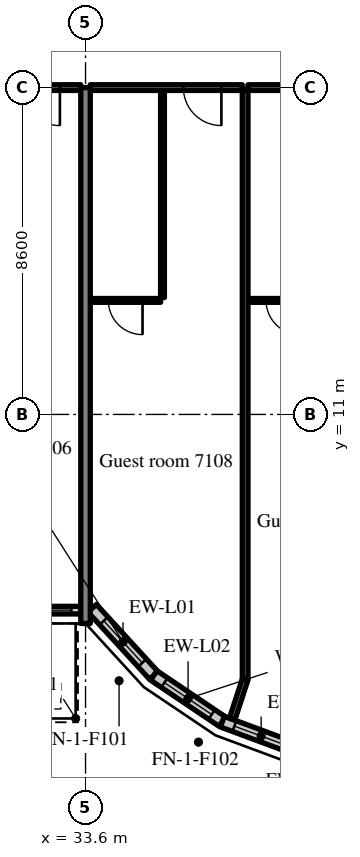
"""IFC4 building model, lengths in metres.
Left out: names, types, materials, properties, quantities, classifications, styles, units other than length and angle.
Written with IfcOpenShell. Run it as: python <this file> out.ifc"""

import sys

from ifc_helpers import new_model, si_unit, direction, frame, frame_2d, origin, place, context, subcontext, project, spatial, rectangle, extrude, source, transform, mapped, element, fill, save


model = new_model("IFC4")
c1 = context("Model", 3, precision=1e-05, world=origin(), true_north=direction((0.0, 1.0)))
c2 = subcontext(c1, "Body", "Model", "MODEL_VIEW")
j1 = project(units=[si_unit("LENGTHUNIT", "METRE"), si_unit("PLANEANGLEUNIT", "RADIAN")], contexts=[c1])
p1 = place(None, origin())
s1 = spatial("IfcSite", under=j1, at=p1, CompositionType="ELEMENT")
p2 = place(p1, origin())
s2 = spatial("IfcBuilding", under=s1, at=p2, CompositionType="ELEMENT")
p3 = place(p2, frame((0.0, 0.0, 297.7)))
s3 = spatial("IfcBuildingStorey", under=s2, at=p3, CompositionType="ELEMENT", Elevation=297.7)
m1 = source(origin(), c2, "Body", "SweptSolid", [
    extrude(rectangle(XDim=14.1, YDim=0.25, at=frame_2d((7.05, 0.0))), origin(), (0.0, 0.0, 1.0), 3.72),
])
p4 = place(p3, frame((33.6, 5.5, 0.0), z_axis=(0.0, 0.0, 1.0), x_axis=(0.0, 1.0, 0.0)))
e1 = element("IfcWall", 1, at=p4, inside=s3, PredefinedType="SHEAR", context=c2, shape_type="MappedRepresentation", body=[
    mapped(m1, transform((0.0, 0.0, 0.0), scale=1.0)),
])
m2 = source(origin(), c2, "Body", "SweptSolid", [
    extrude(rectangle(XDim=8.15, YDim=0.2, at=frame_2d((4.075, 0.0))), origin(), (0.0, 0.0, 1.0), 3.17),
])
p5 = place(p3, frame((25.325, 5.85, 0.0), z_axis=(0.0, 0.0, 1.0), x_axis=(1.0, 0.0, 0.0)))
e2 = element("IfcWall", 2, at=p5, inside=s3, PredefinedType="SOLIDWALL", context=c2, shape_type="MappedRepresentation", body=[
    mapped(m2, transform((0.0, 0.0, 0.0), scale=1.0)),
])
m3 = source(origin(), c2, "Body", "SweptSolid", [
    extrude(rectangle(XDim=1.2, YDim=2.4, at=frame_2d((0.6, 1.2))), frame((0.0, 0.11, 0.0), z_axis=(0.0, -1.0, 0.0), x_axis=(1.0, 0.0, 0.0)), (0.0, 0.0, 1.0), 0.22),
])
p6 = place(p5, frame((0.25, 0.0, 0.0)))
e3 = element("IfcOpeningElement", 3, at=p6, cuts=e2, PredefinedType="OPENING", context=c2, shape_type="MappedRepresentation", body=[
    mapped(m3, transform((0.0, 0.0, 0.0), scale=1.0)),
])
m4 = source(origin(), c2, "Body", "SweptSolid", [
    extrude(rectangle(XDim=1.5, YDim=1.5, at=frame_2d((0.75, 0.75))), frame((0.0, 0.11, 0.0), z_axis=(0.0, -1.0, 0.0), x_axis=(1.0, 0.0, 0.0)), (0.0, 0.0, 1.0), 0.22),
])
p7 = place(p5, frame((2.325, 0.0, 0.9)))
e4 = element("IfcOpeningElement", 4, at=p7, cuts=e2, PredefinedType="OPENING", context=c2, shape_type="MappedRepresentation", body=[
    mapped(m4, transform((0.0, 0.0, 0.0), scale=1.0)),
])
p8 = place(p5, frame((4.325, 0.0, 0.0)))
e5 = element("IfcOpeningElement", 5, at=p8, cuts=e2, PredefinedType="OPENING", context=c2, shape_type="MappedRepresentation", body=[
    mapped(m3, transform((0.0, 0.0, 0.0), scale=1.0)),
])
p9 = place(p5, frame((6.4, 0.0, 0.9)))
e6 = element("IfcOpeningElement", 6, at=p9, cuts=e2, PredefinedType="OPENING", context=c2, shape_type="MappedRepresentation", body=[
    mapped(m4, transform((0.0, 0.0, 0.0), scale=1.0)),
])
m5 = source(origin(), c2, "Body", "SweptSolid", [
    extrude(rectangle(XDim=2.398, YDim=0.3, at=frame_2d((1.199, 0.0))), origin(), (0.0, 0.0, 1.0), 3.72),
])
p10 = place(p3, frame((33.776, 5.9, 0.0), z_axis=(0.0, 0.0, 1.0), x_axis=(0.675374189419, -0.737475222815, 0.0)))
e7 = element("IfcWall", 7, at=p10, inside=s3, PredefinedType="SOLIDWALL", context=c2, shape_type="MappedRepresentation", body=[
    mapped(m5, transform((0.0, 0.0, 0.0), scale=1.0)),
])
m6 = source(origin(), c2, "Body", "SweptSolid", [
    extrude(rectangle(XDim=1.5, YDim=2.0, at=frame_2d((0.75, 1.0))), frame((0.0, 0.16, 0.0), z_axis=(0.0, -1.0, 0.0), x_axis=(1.0, 0.0, 0.0)), (0.0, 0.0, 1.0), 0.32),
])
p11 = place(p10, frame((0.449, 0.0, 0.9)))
e8 = element("IfcOpeningElement", 8, at=p11, cuts=e7, PredefinedType="OPENING", context=c2, shape_type="MappedRepresentation", body=[
    mapped(m6, transform((0.0, 0.0, 0.0), scale=1.0)),
])
m7 = source(origin(), c2, "Body", "SweptSolid", [
    extrude(rectangle(XDim=2.176, YDim=0.3, at=frame_2d((1.088, 0.0))), origin(), (0.0, 0.0, 1.0), 3.72),
])
p12 = place(p3, frame((35.396, 4.131, 0.0), z_axis=(0.0, 0.0, 1.0), x_axis=(0.829590746428, -0.558371913192, 0.0)))
e9 = element("IfcWall", 9, at=p12, inside=s3, PredefinedType="SOLIDWALL", context=c2, shape_type="MappedRepresentation", body=[
    mapped(m7, transform((0.0, 0.0, 0.0), scale=1.0)),
])
p13 = place(p12, frame((0.338, 0.0, 0.9)))
e10 = element("IfcOpeningElement", 10, at=p13, cuts=e9, PredefinedType="OPENING", context=c2, shape_type="MappedRepresentation", body=[
    mapped(m6, transform((0.0, 0.0, 0.0), scale=1.0)),
])
p14 = place(p3, frame((37.201, 2.917, 0.0), z_axis=(0.0, 0.0, 1.0), x_axis=(0.93754555999, -0.347862505801, 0.0)))
e11 = element("IfcWall", 11, at=p14, inside=s3, PredefinedType="SOLIDWALL", context=c2, shape_type="MappedRepresentation", body=[
    mapped(m7, transform((0.0, 0.0, 0.0), scale=1.0)),
])
p15 = place(p14, frame((0.338, 0.0, 0.9)))
e12 = element("IfcOpeningElement", 12, at=p15, cuts=e11, PredefinedType="OPENING", context=c2, shape_type="MappedRepresentation", body=[
    mapped(m6, transform((0.0, 0.0, 0.0), scale=1.0)),
])
m8 = source(origin(), c2, "Body", "SweptSolid", [
    extrude(rectangle(XDim=4.0, YDim=0.15, at=frame_2d((2.0, 0.0))), origin(), (0.0, 0.0, 1.0), 3.02),
])
p16 = place(p3, frame((29.475, 19.6, 0.0), z_axis=(0.0, 0.0, 1.0), x_axis=(1.0, 0.0, 0.0)))
e13 = element("IfcWall", 13, at=p16, inside=s3, PredefinedType="PARTITIONING", context=c2, shape_type="MappedRepresentation", body=[
    mapped(m8, transform((0.0, 0.0, 0.0), scale=1.0)),
])
m9 = source(origin(), c2, "Body", "SweptSolid", [
    extrude(rectangle(XDim=1.0, YDim=2.1, at=frame_2d((0.5, 1.05))), frame((0.0, 0.085, 0.0), z_axis=(0.0, -1.0, 0.0), x_axis=(1.0, 0.0, 0.0)), (0.0, 0.0, 1.0), 0.17),
])
p17 = place(p16, frame((2.45, 0.0, 0.0)))
e14 = element("IfcOpeningElement", 14, at=p17, cuts=e13, PredefinedType="OPENING", context=c2, shape_type="MappedRepresentation", body=[
    mapped(m9, transform((0.0, 0.0, 0.0), scale=1.0)),
])
m10 = source(origin(), c2, "Body", "SweptSolid", [
    extrude(rectangle(XDim=5.45, YDim=0.1, at=frame_2d((2.725, 0.0))), origin(), (0.0, 0.0, 1.0), 3.72),
])
p18 = place(p3, frame((35.625, 14.075, 0.0), z_axis=(0.0, 0.0, 1.0), x_axis=(0.0, 1.0, 0.0)))
e15 = element("IfcWall", 15, at=p18, inside=s3, PredefinedType="PARTITIONING", context=c2, shape_type="MappedRepresentation", body=[
    mapped(m10, transform((0.0, 0.0, 0.0), scale=1.0)),
])
m11 = source(origin(), c2, "Body", "SweptSolid", [
    extrude(rectangle(XDim=1.85, YDim=0.1, at=frame_2d((0.925, 0.0))), origin(), (0.0, 0.0, 1.0), 3.72),
])
p19 = place(p3, frame((33.725, 14.0, 0.0), z_axis=(0.0, 0.0, 1.0), x_axis=(1.0, 0.0, 0.0)))
e16 = element("IfcWall", 16, at=p19, inside=s3, PredefinedType="PARTITIONING", context=c2, shape_type="MappedRepresentation", body=[
    mapped(m11, transform((0.0, 0.0, 0.0), scale=1.0)),
])
m12 = source(origin(), c2, "Body", "SweptSolid", [
    extrude(rectangle(XDim=0.9, YDim=2.1, at=frame_2d((0.45, 1.05))), frame((0.0, 0.06, 0.0), z_axis=(0.0, -1.0, 0.0), x_axis=(1.0, 0.0, 0.0)), (0.0, 0.0, 1.0), 0.12),
])
p20 = place(p19, frame((0.475, 0.0, 0.0)))
e17 = element("IfcOpeningElement", 17, at=p20, cuts=e16, PredefinedType="OPENING", context=c2, shape_type="MappedRepresentation", body=[
    mapped(m12, transform((0.0, 0.0, 0.0), scale=1.0)),
])
p21 = place(p3, frame((33.725, 19.6, 0.0), z_axis=(0.0, 0.0, 1.0), x_axis=(1.0, 0.0, 0.0)))
e18 = element("IfcWall", 18, at=p21, inside=s3, PredefinedType="PARTITIONING", context=c2, shape_type="MappedRepresentation", body=[
    mapped(m8, transform((0.0, 0.0, 0.0), scale=1.0)),
])
p22 = place(p21, frame((2.45, 0.0, 0.0)))
e19 = element("IfcOpeningElement", 19, at=p22, cuts=e18, PredefinedType="OPENING", context=c2, shape_type="MappedRepresentation", body=[
    mapped(m9, transform((0.0, 0.0, 0.0), scale=1.0)),
])
m13 = source(origin(), c2, "Body", "SweptSolid", [
    extrude(rectangle(XDim=1.85, YDim=0.1, at=frame_2d((0.925, 0.0))), origin(), (0.0, 0.0, 1.0), 3.72),
])
p23 = place(p3, frame((37.875, 14.0, 0.0), z_axis=(0.0, 0.0, 1.0), x_axis=(1.0, 0.0, 0.0)))
e20 = element("IfcWall", 20, at=p23, inside=s3, PredefinedType="PARTITIONING", context=c2, shape_type="MappedRepresentation", body=[
    mapped(m13, transform((0.0, 0.0, 0.0), scale=1.0)),
])
p24 = place(p23, frame((0.475, 0.0, 0.0)))
e21 = element("IfcOpeningElement", 21, at=p24, cuts=e20, PredefinedType="OPENING", context=c2, shape_type="MappedRepresentation", body=[
    mapped(m12, transform((0.0, 0.0, 0.0), scale=1.0)),
])
p25 = place(p3, frame((37.875, 19.6, 0.0), z_axis=(0.0, 0.0, 1.0), x_axis=(1.0, 0.0, 0.0)))
e22 = element("IfcWall", 22, at=p25, inside=s3, PredefinedType="PARTITIONING", context=c2, shape_type="MappedRepresentation", body=[
    mapped(m8, transform((0.0, 0.0, 0.0), scale=1.0)),
])
p26 = place(p25, frame((2.45, 0.0, 0.0)))
e23 = element("IfcOpeningElement", 23, at=p26, cuts=e22, PredefinedType="OPENING", context=c2, shape_type="MappedRepresentation", body=[
    mapped(m9, transform((0.0, 0.0, 0.0), scale=1.0)),
])
m14 = source(origin(), c2, "Body", "SweptSolid", [
    extrude(rectangle(XDim=15.498, YDim=0.15, at=frame_2d((7.749, 0.0))), origin(), (0.0, 0.0, 1.0), 3.72),
])
p27 = place(p3, frame((37.8, 4.027, 0.0), z_axis=(0.0, 0.0, 1.0), x_axis=(0.0, 1.0, 0.0)))
e24 = element("IfcWall", 24, at=p27, inside=s3, PredefinedType="PARTITIONING", context=c2, shape_type="MappedRepresentation", body=[
    mapped(m14, transform((0.0, 0.0, 0.0), scale=1.0)),
])
m15 = source(origin(), c2, "Body", "SweptSolid", [
    extrude(rectangle(XDim=1.101, YDim=0.15, at=frame_2d((0.55, 0.0))), origin(), (0.0, 0.0, 1.0), 3.72),
])
p28 = place(p3, frame((37.457, 2.981, 0.0), z_axis=(0.0, 0.0, 1.0), x_axis=(0.311567081539, 0.950224159712, 0.0)))
e25 = element("IfcWall", 25, at=p28, inside=s3, PredefinedType="PARTITIONING", context=c2, shape_type="MappedRepresentation", body=[
    mapped(m15, transform((0.0, 0.0, 0.0), scale=1.0)),
])
m16 = source(origin(), c2, "Body", "SweptSolid", [
    extrude(rectangle(XDim=1.5, YDim=1.5, at=frame_2d((0.75, 0.75))), frame((0.0, 0.03, 0.0), z_axis=(0.0, -1.0, 0.0), x_axis=(1.0, 0.0, 0.0)), (0.0, 0.0, 1.0), 0.06),
])
p29 = place(p9, origin())
e26 = element("IfcWindow", 26, at=p29, inside=s3, PartitioningType="SINGLE_PANEL", PredefinedType="WINDOW", context=c2, shape_type="MappedRepresentation", body=[
    mapped(m16, transform((0.0, 0.0, 0.0), scale=1.0)),
])
fill(e6, e26)
m17 = source(origin(), c2, "Body", "SweptSolid", [
    extrude(rectangle(XDim=1.5, YDim=2.0, at=frame_2d((0.75, 1.0))), frame((0.0, 0.03, 0.0), z_axis=(0.0, -1.0, 0.0), x_axis=(1.0, 0.0, 0.0)), (0.0, 0.0, 1.0), 0.06),
])
p30 = place(p11, origin())
e27 = element("IfcWindow", 27, at=p30, inside=s3, PartitioningType="SINGLE_PANEL", PredefinedType="WINDOW", context=c2, shape_type="MappedRepresentation", body=[
    mapped(m17, transform((0.0, 0.0, 0.0), scale=1.0)),
])
fill(e8, e27)
p31 = place(p13, origin())
e28 = element("IfcWindow", 28, at=p31, inside=s3, PartitioningType="SINGLE_PANEL", PredefinedType="WINDOW", context=c2, shape_type="MappedRepresentation", body=[
    mapped(m17, transform((0.0, 0.0, 0.0), scale=1.0)),
])
fill(e10, e28)
p32 = place(p15, origin())
e29 = element("IfcWindow", 29, at=p32, inside=s3, PartitioningType="SINGLE_PANEL", PredefinedType="WINDOW", context=c2, shape_type="MappedRepresentation", body=[
    mapped(m17, transform((0.0, 0.0, 0.0), scale=1.0)),
])
fill(e12, e29)
m18 = source(origin(), c2, "Body", "SweptSolid", [
    extrude(rectangle(XDim=1.0, YDim=2.1, at=frame_2d((0.5, 1.05))), frame((0.0, 0.025, 0.0), z_axis=(0.0, -1.0, 0.0), x_axis=(1.0, 0.0, 0.0)), (0.0, 0.0, 1.0), 0.05),
])
p33 = place(p17, origin())
e30 = element("IfcDoor", 30, at=p33, inside=s3, OperationType="SINGLE_SWING_RIGHT", PredefinedType="DOOR", context=c2, shape_type="MappedRepresentation", body=[
    mapped(m18, transform((0.0, 0.0, 0.0), scale=1.0)),
])
fill(e14, e30)
m19 = source(origin(), c2, "Body", "SweptSolid", [
    extrude(rectangle(XDim=0.9, YDim=2.1, at=frame_2d((0.45, 1.05))), frame((0.0, 0.025, 0.0), z_axis=(0.0, -1.0, 0.0), x_axis=(1.0, 0.0, 0.0)), (0.0, 0.0, 1.0), 0.05),
])
p34 = place(p20, origin())
e31 = element("IfcDoor", 31, at=p34, inside=s3, OperationType="SINGLE_SWING_RIGHT", PredefinedType="DOOR", context=c2, shape_type="MappedRepresentation", body=[
    mapped(m19, transform((0.0, 0.0, 0.0), scale=1.0)),
])
fill(e17, e31)
p35 = place(p22, origin())
e32 = element("IfcDoor", 32, at=p35, inside=s3, OperationType="SINGLE_SWING_RIGHT", PredefinedType="DOOR", context=c2, shape_type="MappedRepresentation", body=[
    mapped(m18, transform((0.0, 0.0, 0.0), scale=1.0)),
])
fill(e19, e32)
p36 = place(p24, origin())
e33 = element("IfcDoor", 33, at=p36, inside=s3, OperationType="SINGLE_SWING_RIGHT", PredefinedType="DOOR", context=c2, shape_type="MappedRepresentation", body=[
    mapped(m19, transform((0.0, 0.0, 0.0), scale=1.0)),
])
fill(e21, e33)
save(model, sys.argv[1])
